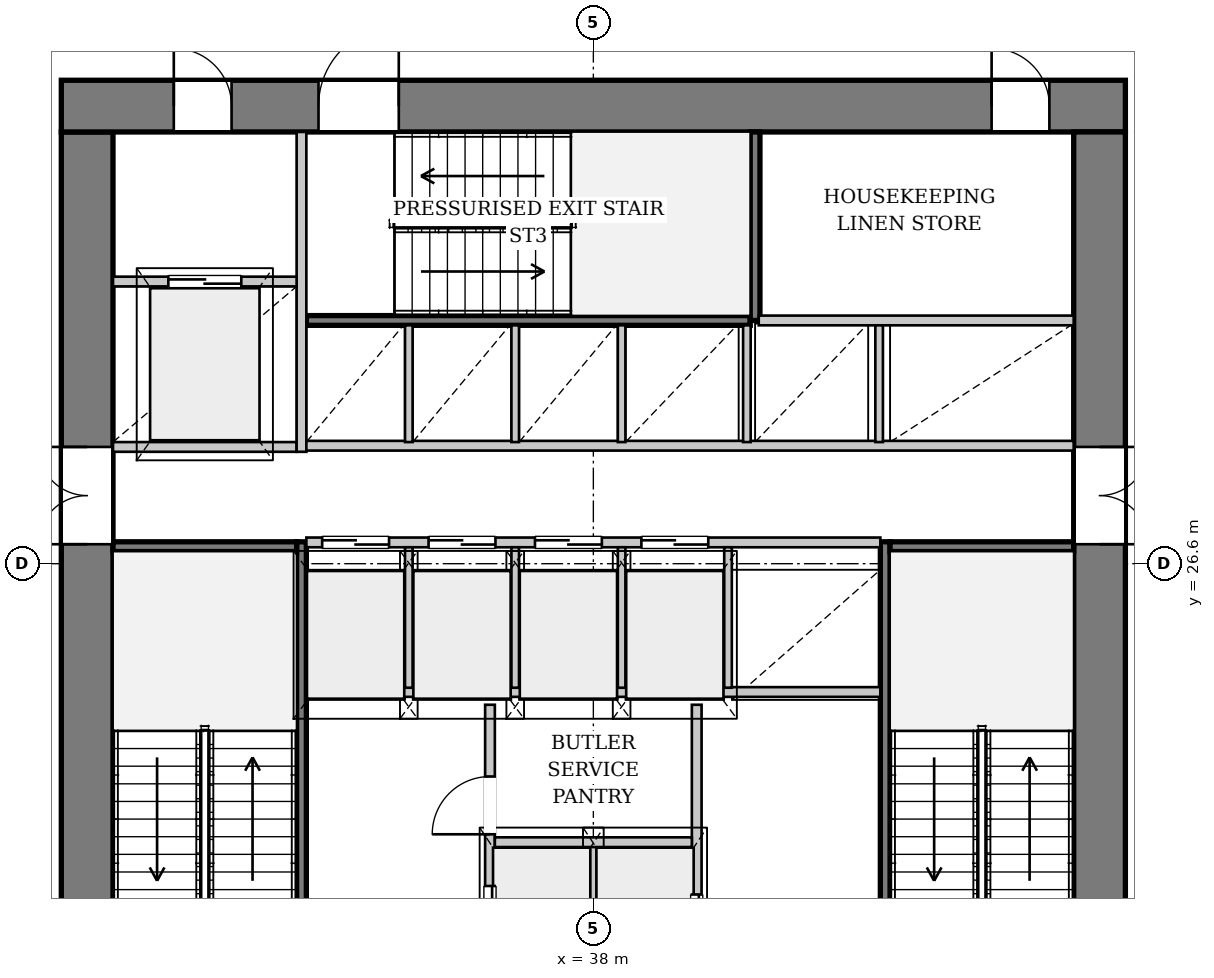
"""IFC4 building model, lengths in metres.
Left out: names, types, materials, properties, quantities, classifications, styles, units other than length and angle.
Written with IfcOpenShell. Run it as: python <this file> out.ifc"""

import sys

from ifc_helpers import new_model, si_unit, direction, frame, frame_2d, origin, place, context, subcontext, project, spatial, rectangle, extrude, source, transform, mapped, element, fill, save


model = new_model("IFC4")
c1 = context("Model", 3, precision=1e-05, world=origin(), true_north=direction((0.0, 1.0)))
c2 = subcontext(c1, "Body", "Model", "MODEL_VIEW")
j1 = project(units=[si_unit("LENGTHUNIT", "METRE"), si_unit("PLANEANGLEUNIT", "RADIAN")], contexts=[c1])
p1 = place(None, origin())
s1 = spatial("IfcSite", under=j1, at=p1, CompositionType="ELEMENT")
p2 = place(p1, origin())
s2 = spatial("IfcBuilding", under=s1, at=p2, CompositionType="ELEMENT")
p3 = place(p2, frame((0.0, 0.0, 64.8)))
s3 = spatial("IfcBuildingStorey", under=s2, at=p3, CompositionType="ELEMENT", Elevation=64.8)
p4 = place(p3, frame((46.771, 43.517, 0.0), z_axis=(0.0, 0.0, 1.0), x_axis=(0.890856769482, -0.454284290141, 0.0)))
e1 = element("IfcWall", 1, at=p4, inside=s3, PredefinedType="SOLIDWALL", context=c2, shape_type="SweptSolid", body=[
    extrude(rectangle(XDim=23.736, YDim=0.32, at=frame_2d((11.868, 0.0))), origin(), (0.0, 0.0, 1.0), 2.592),
])
p5 = place(p4, frame((7.796, 0.0, 0.0)))
e2 = element("IfcOpeningElement", 2, at=p5, cuts=e1, PredefinedType="OPENING", context=c2, shape_type="SweptSolid", body=[
    extrude(rectangle(XDim=1.1, YDim=2.3, at=frame_2d((0.55, 1.15))), frame((0.0, 0.17, 0.0), z_axis=(0.0, -1.0, 0.0), x_axis=(1.0, 0.0, 0.0)), (0.0, 0.0, 1.0), 0.34),
])
p6 = place(p4, frame((16.665, 0.0, 0.272)))
e3 = element("IfcOpeningElement", 3, at=p6, cuts=e1, PredefinedType="OPENING", context=c2, shape_type="SweptSolid", body=[
    extrude(rectangle(XDim=1.8, YDim=2.2, at=frame_2d((0.9, 1.1))), frame((0.0, 0.17, 0.0), z_axis=(0.0, -1.0, 0.0), x_axis=(1.0, 0.0, 0.0)), (0.0, 0.0, 1.0), 0.34),
])
p7 = place(p3, frame((29.675, 19.5, 0.0), z_axis=(0.0, 0.0, 1.0), x_axis=(0.0, 1.0, 0.0)))
e4 = element("IfcWall", 4, at=p7, inside=s3, PredefinedType="SHEAR", context=c2, shape_type="SweptSolid", body=[
    extrude(rectangle(XDim=14.2, YDim=0.85, at=frame_2d((7.1, 0.0))), origin(), (0.0, 0.0, 1.0), 3.3),
])
p8 = place(p7, frame((7.42, 0.0, 0.0)))
e5 = element("IfcOpeningElement", 5, at=p8, cuts=e4, PredefinedType="OPENING", context=c2, shape_type="SweptSolid", body=[
    extrude(rectangle(XDim=1.6, YDim=2.2, at=frame_2d((0.8, 1.1))), frame((0.0, 0.435, 0.0), z_axis=(0.0, -1.0, 0.0), x_axis=(1.0, 0.0, 0.0)), (0.0, 0.0, 1.0), 0.87),
])
p9 = place(p3, frame((29.25, 34.125, 0.0), z_axis=(0.0, 0.0, 1.0), x_axis=(1.0, 0.0, 0.0)))
e6 = element("IfcWall", 6, at=p9, inside=s3, PredefinedType="SHEAR", context=c2, shape_type="SweptSolid", body=[
    extrude(rectangle(XDim=17.5, YDim=0.85, at=frame_2d((8.75, 0.0))), origin(), (0.0, 0.0, 1.0), 3.3),
])
p10 = place(p9, frame((1.85, 0.0, 0.0)))
e7 = element("IfcOpeningElement", 7, at=p10, cuts=e6, PredefinedType="OPENING", context=c2, shape_type="SweptSolid", body=[
    extrude(rectangle(XDim=0.95, YDim=2.1, at=frame_2d((0.475, 1.05))), frame((0.0, 0.435, 0.0), z_axis=(0.0, -1.0, 0.0), x_axis=(1.0, 0.0, 0.0)), (0.0, 0.0, 1.0), 0.87),
])
p11 = place(p9, frame((4.23, 0.0, 0.0)))
e8 = element("IfcOpeningElement", 8, at=p11, cuts=e6, PredefinedType="OPENING", context=c2, shape_type="SweptSolid", body=[
    extrude(rectangle(XDim=1.32, YDim=2.2, at=frame_2d((0.66, 1.1))), frame((0.0, 0.435, 0.0), z_axis=(0.0, -1.0, 0.0), x_axis=(1.0, 0.0, 0.0)), (0.0, 0.0, 1.0), 0.87),
])
p12 = place(p9, frame((15.3, 0.0, 0.0)))
e9 = element("IfcOpeningElement", 9, at=p12, cuts=e6, PredefinedType="OPENING", context=c2, shape_type="SweptSolid", body=[
    extrude(rectangle(XDim=0.95, YDim=2.1, at=frame_2d((0.475, 1.05))), frame((0.0, 0.435, 0.0), z_axis=(0.0, -1.0, 0.0), x_axis=(1.0, 0.0, 0.0)), (0.0, 0.0, 1.0), 0.87),
])
p13 = place(p3, frame((46.325, 33.7, 0.0), z_axis=(0.0, 0.0, 1.0), x_axis=(0.0, -1.0, 0.0)))
e10 = element("IfcWall", 10, at=p13, inside=s3, PredefinedType="SHEAR", context=c2, shape_type="SweptSolid", body=[
    extrude(rectangle(XDim=14.2, YDim=0.85, at=frame_2d((7.1, 0.0))), origin(), (0.0, 0.0, 1.0), 3.3),
])
p14 = place(p13, frame((5.18, 0.0, 0.0)))
e11 = element("IfcOpeningElement", 11, at=p14, cuts=e10, PredefinedType="OPENING", context=c2, shape_type="SweptSolid", body=[
    extrude(rectangle(XDim=1.6, YDim=2.2, at=frame_2d((0.8, 1.1))), frame((0.0, 0.435, 0.0), z_axis=(0.0, -1.0, 0.0), x_axis=(1.0, 0.0, 0.0)), (0.0, 0.0, 1.0), 0.87),
])
p15 = place(p3, frame((33.2, 19.5, 0.0), z_axis=(0.0, 0.0, 1.0), x_axis=(0.0, 1.0, 0.0)))
e12 = element("IfcWall", 12, at=p15, inside=s3, PredefinedType="PARTITIONING", context=c2, shape_type="SweptSolid", body=[
    extrude(rectangle(XDim=7.46, YDim=0.16, at=frame_2d((3.73, 0.0))), origin(), (0.0, 0.0, 1.0), 3.3),
])
p16 = place(p15, frame((0.08, 0.0, 0.0)))
e13 = element("IfcOpeningElement", 13, at=p16, cuts=e12, PredefinedType="OPENING", context=c2, shape_type="SweptSolid", body=[
    extrude(rectangle(XDim=1.32, YDim=2.2, at=frame_2d((0.66, 1.1))), frame((0.0, 0.09, 0.0), z_axis=(0.0, -1.0, 0.0), x_axis=(1.0, 0.0, 0.0)), (0.0, 0.0, 1.0), 0.18),
])
p17 = place(p3, frame((30.1, 26.88, 0.0), z_axis=(0.0, 0.0, 1.0), x_axis=(1.0, 0.0, 0.0)))
e14 = element("IfcWall", 14, at=p17, inside=s3, PredefinedType="PARTITIONING", context=c2, shape_type="SweptSolid", body=[
    extrude(rectangle(XDim=3.02, YDim=0.16, at=frame_2d((1.51, 0.0))), origin(), (0.0, 0.0, 1.0), 3.3),
])
p18 = place(p3, frame((42.8, 26.96, 0.0), z_axis=(0.0, 0.0, 1.0), x_axis=(0.0, -1.0, 0.0)))
e15 = element("IfcWall", 15, at=p18, inside=s3, PredefinedType="PARTITIONING", context=c2, shape_type="SweptSolid", body=[
    extrude(rectangle(XDim=7.46, YDim=0.16, at=frame_2d((3.73, 0.0))), origin(), (0.0, 0.0, 1.0), 3.3),
])
p19 = place(p18, frame((6.06, 0.0, 0.0)))
e16 = element("IfcOpeningElement", 16, at=p19, cuts=e15, PredefinedType="OPENING", context=c2, shape_type="SweptSolid", body=[
    extrude(rectangle(XDim=1.32, YDim=2.2, at=frame_2d((0.66, 1.1))), frame((0.0, 0.09, 0.0), z_axis=(0.0, -1.0, 0.0), x_axis=(1.0, 0.0, 0.0)), (0.0, 0.0, 1.0), 0.18),
])
p20 = place(p3, frame((42.88, 26.88, 0.0), z_axis=(0.0, 0.0, 1.0), x_axis=(1.0, 0.0, 0.0)))
e17 = element("IfcWall", 17, at=p20, inside=s3, PredefinedType="PARTITIONING", context=c2, shape_type="SweptSolid", body=[
    extrude(rectangle(XDim=3.02, YDim=0.16, at=frame_2d((1.51, 0.0))), origin(), (0.0, 0.0, 1.0), 3.3),
])
p21 = place(p3, frame((33.28, 30.6, 0.0), z_axis=(0.0, 0.0, 1.0), x_axis=(1.0, 0.0, 0.0)))
e18 = element("IfcWall", 18, at=p21, inside=s3, PredefinedType="PARTITIONING", context=c2, shape_type="SweptSolid", body=[
    extrude(rectangle(XDim=7.3, YDim=0.16, at=frame_2d((3.65, 0.0))), origin(), (0.0, 0.0, 1.0), 3.3),
])
p22 = place(p3, frame((40.66, 30.6, 0.0), z_axis=(0.0, 0.0, 1.0), x_axis=(0.0, 1.0, 0.0)))
e19 = element("IfcWall", 19, at=p22, inside=s3, PredefinedType="PARTITIONING", context=c2, shape_type="SweptSolid", body=[
    extrude(rectangle(XDim=3.1, YDim=0.16, at=frame_2d((1.55, 0.0))), origin(), (0.0, 0.0, 1.0), 3.3),
])
p23 = place(p3, frame((36.3, 19.5, 0.0), z_axis=(0.0, 0.0, 1.0), x_axis=(0.0, 1.0, 0.0)))
e20 = element("IfcWall", 20, at=p23, inside=s3, PredefinedType="PARTITIONING", context=c2, shape_type="SweptSolid", body=[
    extrude(rectangle(XDim=4.78, YDim=0.16, at=frame_2d((2.39, 0.0))), origin(), (0.0, 0.0, 1.0), 3.3),
])
p24 = place(p23, frame((0.6, 0.0, 0.0)))
e21 = element("IfcOpeningElement", 21, at=p24, cuts=e20, PredefinedType="OPENING", context=c2, shape_type="SweptSolid", body=[
    extrude(rectangle(XDim=1.2, YDim=2.2, at=frame_2d((0.6, 1.1))), frame((0.0, 0.09, 0.0), z_axis=(0.0, -1.0, 0.0), x_axis=(1.0, 0.0, 0.0)), (0.0, 0.0, 1.0), 0.18),
])
p25 = place(p23, frame((2.65, 0.0, 0.0)))
e22 = element("IfcOpeningElement", 22, at=p25, cuts=e20, PredefinedType="OPENING", context=c2, shape_type="SweptSolid", body=[
    extrude(rectangle(XDim=0.95, YDim=2.1, at=frame_2d((0.475, 1.05))), frame((0.0, 0.09, 0.0), z_axis=(0.0, -1.0, 0.0), x_axis=(1.0, 0.0, 0.0)), (0.0, 0.0, 1.0), 0.18),
])
p26 = place(p3, frame((39.7, 24.28, 0.0), z_axis=(0.0, 0.0, 1.0), x_axis=(0.0, -1.0, 0.0)))
e23 = element("IfcWall", 23, at=p26, inside=s3, PredefinedType="PARTITIONING", context=c2, shape_type="SweptSolid", body=[
    extrude(rectangle(XDim=4.78, YDim=0.16, at=frame_2d((2.39, 0.0))), origin(), (0.0, 0.0, 1.0), 3.3),
])
p27 = place(p26, frame((3.12, 0.0, 0.0)))
e24 = element("IfcOpeningElement", 24, at=p27, cuts=e23, PredefinedType="OPENING", context=c2, shape_type="SweptSolid", body=[
    extrude(rectangle(XDim=1.2, YDim=2.2, at=frame_2d((0.6, 1.1))), frame((0.0, 0.09, 0.0), z_axis=(0.0, -1.0, 0.0), x_axis=(1.0, 0.0, 0.0)), (0.0, 0.0, 1.0), 0.18),
])
p28 = place(p3, frame((38.0, 19.5, 0.0), z_axis=(0.0, 0.0, 1.0), x_axis=(0.0, 1.0, 0.0)))
e25 = element("IfcWall", 25, at=p28, inside=s3, PredefinedType="PARTITIONING", context=c2, shape_type="SweptSolid", body=[
    extrude(rectangle(XDim=2.46, YDim=0.125, at=frame_2d((1.23, 0.0))), origin(), (0.0, 0.0, 1.0), 3.3),
])
p29 = place(p3, frame((36.38, 22.02, 0.0), z_axis=(0.0, 0.0, 1.0), x_axis=(1.0, 0.0, 0.0)))
e26 = element("IfcWall", 26, at=p29, inside=s3, PredefinedType="PARTITIONING", context=c2, shape_type="SweptSolid", body=[
    extrude(rectangle(XDim=3.24, YDim=0.16, at=frame_2d((1.62, 0.0))), origin(), (0.0, 0.0, 1.0), 3.3),
])
p30 = place(p3, frame((33.28, 24.49, 0.0), z_axis=(0.0, 0.0, 1.0), x_axis=(1.0, 0.0, 0.0)))
e27 = element("IfcWall", 27, at=p30, inside=s3, PredefinedType="PARTITIONING", context=c2, shape_type="SweptSolid", body=[
    extrude(rectangle(XDim=9.44, YDim=0.16, at=frame_2d((4.72, 0.0))), origin(), (0.0, 0.0, 1.0), 3.3),
])
p31 = place(p3, frame((30.1, 28.52, 0.0), z_axis=(0.0, 0.0, 1.0), x_axis=(1.0, 0.0, 0.0)))
e28 = element("IfcWall", 28, at=p31, inside=s3, PredefinedType="PARTITIONING", context=c2, shape_type="SweptSolid", body=[
    extrude(rectangle(XDim=3.02, YDim=0.16, at=frame_2d((1.51, 0.0))), origin(), (0.0, 0.0, 1.0), 3.3),
])
p32 = place(p3, frame((33.2, 28.44, 0.0), z_axis=(0.0, 0.0, 1.0), x_axis=(0.0, 1.0, 0.0)))
e29 = element("IfcWall", 29, at=p32, inside=s3, PredefinedType="PARTITIONING", context=c2, shape_type="SweptSolid", body=[
    extrude(rectangle(XDim=5.26, YDim=0.16, at=frame_2d((2.63, 0.0))), origin(), (0.0, 0.0, 1.0), 3.3),
])
p33 = place(p3, frame((30.1, 31.24, 0.0), z_axis=(0.0, 0.0, 1.0), x_axis=(1.0, 0.0, 0.0)))
e30 = element("IfcWall", 30, at=p33, inside=s3, PredefinedType="PARTITIONING", context=c2, shape_type="SweptSolid", body=[
    extrude(rectangle(XDim=3.02, YDim=0.16, at=frame_2d((1.51, 0.0))), origin(), (0.0, 0.0, 1.0), 3.3),
])
p34 = place(p33, frame((0.91, 0.0, 0.0)))
e31 = element("IfcOpeningElement", 31, at=p34, cuts=e30, PredefinedType="OPENING", context=c2, shape_type="SweptSolid", body=[
    extrude(rectangle(XDim=1.2, YDim=2.2, at=frame_2d((0.6, 1.1))), frame((0.0, 0.09, 0.0), z_axis=(0.0, -1.0, 0.0), x_axis=(1.0, 0.0, 0.0)), (0.0, 0.0, 1.0), 0.18),
])
p35 = place(p3, frame((33.28, 26.95, 0.0), z_axis=(0.0, 0.0, 1.0), x_axis=(1.0, 0.0, 0.0)))
e32 = element("IfcWall", 32, at=p35, inside=s3, PredefinedType="PARTITIONING", context=c2, shape_type="SweptSolid", body=[
    extrude(rectangle(XDim=9.44, YDim=0.16, at=frame_2d((4.72, 0.0))), origin(), (0.0, 0.0, 1.0), 3.3),
])
p36 = place(p35, frame((0.26, 0.0, 0.0)))
e33 = element("IfcOpeningElement", 33, at=p36, cuts=e32, PredefinedType="OPENING", context=c2, shape_type="SweptSolid", body=[
    extrude(rectangle(XDim=1.1, YDim=2.2, at=frame_2d((0.55, 1.1))), frame((0.0, 0.09, 0.0), z_axis=(0.0, -1.0, 0.0), x_axis=(1.0, 0.0, 0.0)), (0.0, 0.0, 1.0), 0.18),
])
p37 = place(p35, frame((2.01, 0.0, 0.0)))
e34 = element("IfcOpeningElement", 34, at=p37, cuts=e32, PredefinedType="OPENING", context=c2, shape_type="SweptSolid", body=[
    extrude(rectangle(XDim=1.1, YDim=2.2, at=frame_2d((0.55, 1.1))), frame((0.0, 0.09, 0.0), z_axis=(0.0, -1.0, 0.0), x_axis=(1.0, 0.0, 0.0)), (0.0, 0.0, 1.0), 0.18),
])
p38 = place(p35, frame((3.76, 0.0, 0.0)))
e35 = element("IfcOpeningElement", 35, at=p38, cuts=e32, PredefinedType="OPENING", context=c2, shape_type="SweptSolid", body=[
    extrude(rectangle(XDim=1.1, YDim=2.2, at=frame_2d((0.55, 1.1))), frame((0.0, 0.09, 0.0), z_axis=(0.0, -1.0, 0.0), x_axis=(1.0, 0.0, 0.0)), (0.0, 0.0, 1.0), 0.18),
])
p39 = place(p35, frame((5.51, 0.0, 0.0)))
e36 = element("IfcOpeningElement", 36, at=p39, cuts=e32, PredefinedType="OPENING", context=c2, shape_type="SweptSolid", body=[
    extrude(rectangle(XDim=1.1, YDim=2.2, at=frame_2d((0.55, 1.1))), frame((0.0, 0.09, 0.0), z_axis=(0.0, -1.0, 0.0), x_axis=(1.0, 0.0, 0.0)), (0.0, 0.0, 1.0), 0.18),
])
for number, where, z_axis, x_axis in (
    (37, (34.965, 24.56, 0.0), (0.0, 0.0, 1.0), (0.0, 1.0, 0.0)),
    (38, (36.715, 24.56, 0.0), (0.0, 0.0, 1.0), (0.0, 1.0, 0.0)),
    (39, (38.465, 24.56, 0.0), (0.0, 0.0, 1.0), (0.0, 1.0, 0.0)),
    (40, (40.215, 24.56, 0.0), (0.0, 0.0, 1.0), (0.0, 1.0, 0.0)),
):
    element("IfcWall", number, at=place(p3, frame(where, z_axis=z_axis, x_axis=x_axis)), inside=s3, PredefinedType="PARTITIONING", context=c2, shape_type="SweptSolid", body=[
        extrude(rectangle(XDim=2.31, YDim=0.125, at=frame_2d((1.155, 0.0))), origin(), (0.0, 0.0, 1.0), 3.3),
    ])
p40 = place(p3, frame((33.28, 28.54, 0.0), z_axis=(0.0, 0.0, 1.0), x_axis=(1.0, 0.0, 0.0)))
e41 = element("IfcWall", 41, at=p40, inside=s3, PredefinedType="PARTITIONING", context=c2, shape_type="SweptSolid", body=[
    extrude(rectangle(XDim=12.62, YDim=0.16, at=frame_2d((6.31, 0.0))), origin(), (0.0, 0.0, 1.0), 3.3),
])
p41 = place(p3, frame((40.72, 30.6, 0.0), z_axis=(0.0, 0.0, 1.0), x_axis=(1.0, 0.0, 0.0)))
e42 = element("IfcWall", 42, at=p41, inside=s3, PredefinedType="PARTITIONING", context=c2, shape_type="SweptSolid", body=[
    extrude(rectangle(XDim=5.18, YDim=0.16, at=frame_2d((2.59, 0.0))), origin(), (0.0, 0.0, 1.0), 3.3),
])
for number, where, z_axis, x_axis in (
    (43, (34.965, 28.6, 0.0), (0.0, 0.0, 1.0), (0.0, 1.0, 0.0)),
    (44, (36.715, 28.6, 0.0), (0.0, 0.0, 1.0), (0.0, 1.0, 0.0)),
    (45, (38.465, 28.6, 0.0), (0.0, 0.0, 1.0), (0.0, 1.0, 0.0)),
    (46, (40.525, 28.6, 0.0), (0.0, 0.0, 1.0), (0.0, 1.0, 0.0)),
    (47, (42.7, 28.6, 0.0), (0.0, 0.0, 1.0), (0.0, 1.0, 0.0)),
):
    element("IfcWall", number, at=place(p3, frame(where, z_axis=z_axis, x_axis=x_axis)), inside=s3, PredefinedType="PARTITIONING", context=c2, shape_type="SweptSolid", body=[
        extrude(rectangle(XDim=1.92, YDim=0.125, at=frame_2d((0.96, 0.0))), origin(), (0.0, 0.0, 1.0), 3.3),
    ])
m1 = source(origin(), c2, "Body", "SweptSolid", [
    extrude(rectangle(XDim=1.6, YDim=2.2, at=frame_2d((0.8, 1.1))), frame((0.0, 0.025, 0.0), z_axis=(0.0, -1.0, 0.0), x_axis=(1.0, 0.0, 0.0)), (0.0, 0.0, 1.0), 0.05),
])
p42 = place(p8, origin())
e48 = element("IfcDoor", 48, at=p42, inside=s3, OperationType="DOUBLE_DOOR_SINGLE_SWING", PredefinedType="DOOR", context=c2, shape_type="MappedRepresentation", body=[
    mapped(m1, transform((0.0, 0.0, 0.0), x_axis=(1.0, 0.0, 0.0), y_axis=(0.0, 1.0, 0.0), z_axis=(0.0, 0.0, 1.0), scale=1.0)),
])
fill(e5, e48)
m2 = source(origin(), c2, "Body", "SweptSolid", [
    extrude(rectangle(XDim=0.95, YDim=2.1, at=frame_2d((0.475, 1.05))), frame((0.0, 0.025, 0.0), z_axis=(0.0, -1.0, 0.0), x_axis=(1.0, 0.0, 0.0)), (0.0, 0.0, 1.0), 0.05),
])
p43 = place(p10, origin())
e49 = element("IfcDoor", 49, at=p43, inside=s3, OperationType="SINGLE_SWING_LEFT", PredefinedType="DOOR", context=c2, shape_type="MappedRepresentation", body=[
    mapped(m2, transform((0.0, 0.0, 0.0), x_axis=(1.0, 0.0, 0.0), y_axis=(0.0, 1.0, 0.0), z_axis=(0.0, 0.0, 1.0), scale=1.0)),
])
fill(e7, e49)
m3 = source(origin(), c2, "Body", "SweptSolid", [
    extrude(rectangle(XDim=1.32, YDim=2.2, at=frame_2d((0.66, 1.1))), frame((0.0, 0.025, 0.0), z_axis=(0.0, -1.0, 0.0), x_axis=(1.0, 0.0, 0.0)), (0.0, 0.0, 1.0), 0.05),
])
p44 = place(p11, origin())
e50 = element("IfcDoor", 50, at=p44, inside=s3, OperationType="SINGLE_SWING_RIGHT", PredefinedType="DOOR", context=c2, shape_type="MappedRepresentation", body=[
    mapped(m3, transform((0.0, 0.0, 0.0), x_axis=(1.0, 0.0, 0.0), y_axis=(0.0, 1.0, 0.0), z_axis=(0.0, 0.0, 1.0), scale=1.0)),
])
fill(e8, e50)
p45 = place(p14, origin())
e51 = element("IfcDoor", 51, at=p45, inside=s3, OperationType="DOUBLE_DOOR_SINGLE_SWING", PredefinedType="DOOR", context=c2, shape_type="MappedRepresentation", body=[
    mapped(m1, transform((0.0, 0.0, 0.0), x_axis=(1.0, 0.0, 0.0), y_axis=(0.0, 1.0, 0.0), z_axis=(0.0, 0.0, 1.0), scale=1.0)),
])
fill(e11, e51)
m4 = source(origin(), c2, "Body", "SweptSolid", [
    extrude(rectangle(XDim=1.2, YDim=2.2, at=frame_2d((0.6, 1.1))), frame((0.0, 0.025, 0.0), z_axis=(0.0, -1.0, 0.0), x_axis=(1.0, 0.0, 0.0)), (0.0, 0.0, 1.0), 0.05),
])
p46 = place(p24, origin())
e52 = element("IfcDoor", 52, at=p46, inside=s3, OperationType="DOUBLE_DOOR_SLIDING", PredefinedType="DOOR", context=c2, shape_type="MappedRepresentation", body=[
    mapped(m4, transform((0.0, 0.0, 0.0), x_axis=(1.0, 0.0, 0.0), y_axis=(0.0, 1.0, 0.0), z_axis=(0.0, 0.0, 1.0), scale=1.0)),
])
fill(e21, e52)
p47 = place(p25, origin())
e53 = element("IfcDoor", 53, at=p47, inside=s3, OperationType="SINGLE_SWING_LEFT", PredefinedType="DOOR", context=c2, shape_type="MappedRepresentation", body=[
    mapped(m2, transform((0.0, 0.0, 0.0), x_axis=(1.0, 0.0, 0.0), y_axis=(0.0, 1.0, 0.0), z_axis=(0.0, 0.0, 1.0), scale=1.0)),
])
fill(e22, e53)
p48 = place(p27, origin())
e54 = element("IfcDoor", 54, at=p48, inside=s3, OperationType="DOUBLE_DOOR_SLIDING", PredefinedType="DOOR", context=c2, shape_type="MappedRepresentation", body=[
    mapped(m4, transform((0.0, 0.0, 0.0), x_axis=(1.0, 0.0, 0.0), y_axis=(0.0, 1.0, 0.0), z_axis=(0.0, 0.0, 1.0), scale=1.0)),
])
fill(e24, e54)
p49 = place(p34, origin())
e55 = element("IfcDoor", 55, at=p49, inside=s3, OperationType="DOUBLE_DOOR_SLIDING", PredefinedType="DOOR", context=c2, shape_type="MappedRepresentation", body=[
    mapped(m4, transform((0.0, 0.0, 0.0), x_axis=(1.0, 0.0, 0.0), y_axis=(0.0, 1.0, 0.0), z_axis=(0.0, 0.0, 1.0), scale=1.0)),
])
fill(e31, e55)
m5 = source(origin(), c2, "Body", "SweptSolid", [
    extrude(rectangle(XDim=1.1, YDim=2.2, at=frame_2d((0.55, 1.1))), frame((0.0, 0.025, 0.0), z_axis=(0.0, -1.0, 0.0), x_axis=(1.0, 0.0, 0.0)), (0.0, 0.0, 1.0), 0.05),
])
p50 = place(p36, origin())
e56 = element("IfcDoor", 56, at=p50, inside=s3, OperationType="DOUBLE_DOOR_SLIDING", PredefinedType="DOOR", context=c2, shape_type="MappedRepresentation", body=[
    mapped(m5, transform((0.0, 0.0, 0.0), x_axis=(1.0, 0.0, 0.0), y_axis=(0.0, 1.0, 0.0), z_axis=(0.0, 0.0, 1.0), scale=1.0)),
])
fill(e33, e56)
p51 = place(p37, origin())
e57 = element("IfcDoor", 57, at=p51, inside=s3, OperationType="DOUBLE_DOOR_SLIDING", PredefinedType="DOOR", context=c2, shape_type="MappedRepresentation", body=[
    mapped(m5, transform((0.0, 0.0, 0.0), x_axis=(1.0, 0.0, 0.0), y_axis=(0.0, 1.0, 0.0), z_axis=(0.0, 0.0, 1.0), scale=1.0)),
])
fill(e34, e57)
p52 = place(p38, origin())
e58 = element("IfcDoor", 58, at=p52, inside=s3, OperationType="DOUBLE_DOOR_SLIDING", PredefinedType="DOOR", context=c2, shape_type="MappedRepresentation", body=[
    mapped(m5, transform((0.0, 0.0, 0.0), x_axis=(1.0, 0.0, 0.0), y_axis=(0.0, 1.0, 0.0), z_axis=(0.0, 0.0, 1.0), scale=1.0)),
])
fill(e35, e58)
p53 = place(p39, origin())
e59 = element("IfcDoor", 59, at=p53, inside=s3, OperationType="DOUBLE_DOOR_SLIDING", PredefinedType="DOOR", context=c2, shape_type="MappedRepresentation", body=[
    mapped(m5, transform((0.0, 0.0, 0.0), x_axis=(1.0, 0.0, 0.0), y_axis=(0.0, 1.0, 0.0), z_axis=(0.0, 0.0, 1.0), scale=1.0)),
])
fill(e36, e59)
p54 = place(p12, origin())
e60 = element("IfcDoor", 60, at=p54, inside=s3, OperationType="SINGLE_SWING_LEFT", PredefinedType="DOOR", context=c2, shape_type="MappedRepresentation", body=[
    mapped(m2, transform((0.0, 0.0, 0.0), x_axis=(1.0, 0.0, 0.0), y_axis=(0.0, 1.0, 0.0), z_axis=(0.0, 0.0, 1.0), scale=1.0)),
])
fill(e9, e60)
save(model, sys.argv[1])
